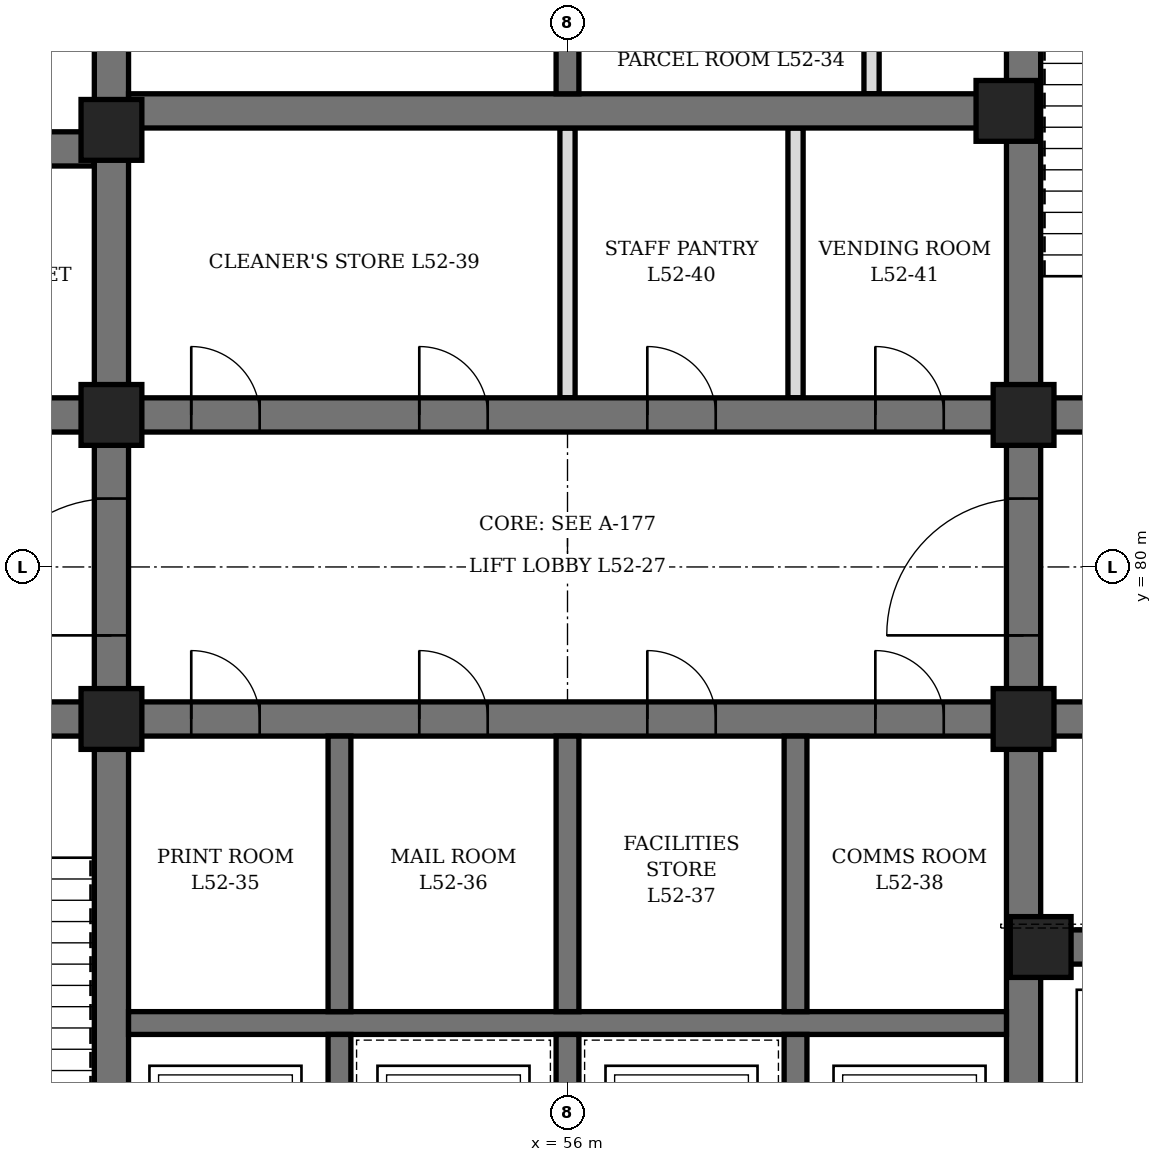
"""IFC4 building model, lengths in metres.
Left out: names, types, materials, properties, quantities, classifications, styles, units other than length and angle.
Written with IfcOpenShell. Run it as: python <this file> out.ifc"""

import sys

from ifc_helpers import new_model, si_unit, direction, frame, frame_2d, origin, origin_2d, place, context, subcontext, project, spatial, rectangle, hollow_rectangle, extrude, element, fill, save


model = new_model("IFC4")
c1 = context("Model", 3, precision=1e-05, world=origin(), true_north=direction((0.0, 1.0)))
c2 = subcontext(c1, "Body", "Model", "MODEL_VIEW")
j1 = project(units=[si_unit("LENGTHUNIT", "METRE"), si_unit("PLANEANGLEUNIT", "RADIAN")], contexts=[c1])
p1 = place(None, origin())
s1 = spatial("IfcSite", under=j1, at=p1, CompositionType="ELEMENT")
p2 = place(p1, origin())
s2 = spatial("IfcBuilding", under=s1, at=p2, CompositionType="ELEMENT")
p3 = place(p2, frame((0.0, 0.0, 231.7)))
s3 = spatial("IfcBuildingStorey", under=s2, at=p3, CompositionType="ELEMENT", Elevation=231.7)
p4 = place(p3, frame((50.0, 71.6, 0.0), z_axis=(0.0, 0.0, 1.0), x_axis=(0.0, 1.0, 0.0)))
e1 = element("IfcWall", 1, at=p4, inside=s3, PredefinedType="SHEAR", context=c2, shape_type="SweptSolid", body=[
    extrude(rectangle(XDim=16.8, YDim=0.45, at=frame_2d((8.4, 0.0))), origin(), (0.0, 0.0, 1.0), 4.2),
])
p5 = place(p4, frame((7.5, 0.0, 0.0)))
e2 = element("IfcOpeningElement", 2, at=p5, cuts=e1, PredefinedType="OPENING", context=c2, shape_type="SweptSolid", body=[
    extrude(rectangle(XDim=1.8, YDim=2.4, at=frame_2d((0.9, 1.2))), frame((0.0, 0.235, 0.0), z_axis=(0.0, -1.0, 0.0), x_axis=(1.0, 0.0, 0.0)), (0.0, 0.0, 1.0), 0.47),
])
p6 = place(p3, frame((62.0, 71.6, 0.0), z_axis=(0.0, 0.0, 1.0), x_axis=(0.0, 1.0, 0.0)))
e3 = element("IfcWall", 3, at=p6, inside=s3, PredefinedType="SHEAR", context=c2, shape_type="SweptSolid", body=[
    extrude(rectangle(XDim=16.8, YDim=0.45, at=frame_2d((8.4, 0.0))), origin(), (0.0, 0.0, 1.0), 4.2),
])
p7 = place(p6, frame((7.5, 0.0, 0.0)))
e4 = element("IfcOpeningElement", 4, at=p7, cuts=e3, PredefinedType="OPENING", context=c2, shape_type="SweptSolid", body=[
    extrude(rectangle(XDim=1.8, YDim=2.4, at=frame_2d((0.9, 1.2))), frame((0.0, 0.235, 0.0), z_axis=(0.0, -1.0, 0.0), x_axis=(1.0, 0.0, 0.0)), (0.0, 0.0, 1.0), 0.47),
])
p8 = place(p3, frame((44.6, 78.0, 0.0), z_axis=(0.0, 0.0, 1.0), x_axis=(1.0, 0.0, 0.0)))
e5 = element("IfcWall", 5, at=p8, inside=s3, PredefinedType="SHEAR", context=c2, shape_type="SweptSolid", body=[
    extrude(rectangle(XDim=5.175, YDim=0.45, at=frame_2d((2.587, 0.0))), origin(), (0.0, 0.0, 1.0), 4.2),
])
p9 = place(p8, frame((1.8, 0.0, 0.0)))
e6 = element("IfcOpeningElement", 6, at=p9, cuts=e5, PredefinedType="OPENING", context=c2, shape_type="SweptSolid", body=[
    extrude(rectangle(XDim=1.2, YDim=2.1, at=frame_2d((0.6, 1.05))), frame((0.0, 0.235, 0.0), z_axis=(0.0, -1.0, 0.0), x_axis=(1.0, 0.0, 0.0)), (0.0, 0.0, 1.0), 0.47),
])
p10 = place(p3, frame((44.6, 82.0, 0.0), z_axis=(0.0, 0.0, 1.0), x_axis=(1.0, 0.0, 0.0)))
e7 = element("IfcWall", 7, at=p10, inside=s3, PredefinedType="SHEAR", context=c2, shape_type="SweptSolid", body=[
    extrude(rectangle(XDim=5.175, YDim=0.45, at=frame_2d((2.587, 0.0))), origin(), (0.0, 0.0, 1.0), 4.2),
])
p11 = place(p10, frame((0.7, 0.0, 0.0)))
e8 = element("IfcOpeningElement", 8, at=p11, cuts=e7, PredefinedType="OPENING", context=c2, shape_type="SweptSolid", body=[
    extrude(rectangle(XDim=0.9, YDim=2.1, at=frame_2d((0.45, 1.05))), frame((0.0, 0.235, 0.0), z_axis=(0.0, -1.0, 0.0), x_axis=(1.0, 0.0, 0.0)), (0.0, 0.0, 1.0), 0.47),
])
p12 = place(p3, frame((44.6, 85.5, 0.0), z_axis=(0.0, 0.0, 1.0), x_axis=(1.0, 0.0, 0.0)))
e9 = element("IfcWall", 9, at=p12, inside=s3, PredefinedType="SHEAR", context=c2, shape_type="SweptSolid", body=[
    extrude(rectangle(XDim=5.175, YDim=0.45, at=frame_2d((2.587, 0.0))), origin(), (0.0, 0.0, 1.0), 4.2),
])
p13 = place(p12, frame((0.7, 0.0, 0.0)))
e10 = element("IfcOpeningElement", 10, at=p13, cuts=e9, PredefinedType="OPENING", context=c2, shape_type="SweptSolid", body=[
    extrude(rectangle(XDim=0.9, YDim=2.1, at=frame_2d((0.45, 1.05))), frame((0.0, 0.235, 0.0), z_axis=(0.0, -1.0, 0.0), x_axis=(1.0, 0.0, 0.0)), (0.0, 0.0, 1.0), 0.47),
])
p14 = place(p3, frame((62.225, 75.0, 0.0), z_axis=(0.0, 0.0, 1.0), x_axis=(1.0, 0.0, 0.0)))
e11 = element("IfcWall", 11, at=p14, inside=s3, PredefinedType="SHEAR", context=c2, shape_type="SweptSolid", body=[
    extrude(rectangle(XDim=5.175, YDim=0.45, at=frame_2d((2.587, 0.0))), origin(), (0.0, 0.0, 1.0), 4.2),
])
p15 = place(p14, frame((0.675, 0.0, 0.0)))
e12 = element("IfcOpeningElement", 12, at=p15, cuts=e11, PredefinedType="OPENING", context=c2, shape_type="SweptSolid", body=[
    extrude(rectangle(XDim=1.2, YDim=2.2, at=frame_2d((0.6, 1.1))), frame((0.0, 0.235, 0.0), z_axis=(0.0, -1.0, 0.0), x_axis=(1.0, 0.0, 0.0)), (0.0, 0.0, 1.0), 0.47),
])
p16 = place(p14, frame((3.425, 0.0, 0.0)))
e13 = element("IfcOpeningElement", 13, at=p16, cuts=e11, PredefinedType="OPENING", context=c2, shape_type="SweptSolid", body=[
    extrude(rectangle(XDim=1.2, YDim=2.2, at=frame_2d((0.6, 1.1))), frame((0.0, 0.235, 0.0), z_axis=(0.0, -1.0, 0.0), x_axis=(1.0, 0.0, 0.0)), (0.0, 0.0, 1.0), 0.47),
])
p17 = place(p3, frame((62.225, 78.0, 0.0), z_axis=(0.0, 0.0, 1.0), x_axis=(1.0, 0.0, 0.0)))
e14 = element("IfcWall", 14, at=p17, inside=s3, PredefinedType="SHEAR", context=c2, shape_type="SweptSolid", body=[
    extrude(rectangle(XDim=5.175, YDim=0.45, at=frame_2d((2.587, 0.0))), origin(), (0.0, 0.0, 1.0), 4.2),
])
p18 = place(p17, frame((2.175, 0.0, 0.0)))
e15 = element("IfcOpeningElement", 15, at=p18, cuts=e14, PredefinedType="OPENING", context=c2, shape_type="SweptSolid", body=[
    extrude(rectangle(XDim=1.2, YDim=2.1, at=frame_2d((0.6, 1.05))), frame((0.0, 0.235, 0.0), z_axis=(0.0, -1.0, 0.0), x_axis=(1.0, 0.0, 0.0)), (0.0, 0.0, 1.0), 0.47),
])
p19 = place(p3, frame((62.225, 82.0, 0.0), z_axis=(0.0, 0.0, 1.0), x_axis=(1.0, 0.0, 0.0)))
e16 = element("IfcWall", 16, at=p19, inside=s3, PredefinedType="SHEAR", context=c2, shape_type="SweptSolid", body=[
    extrude(rectangle(XDim=5.175, YDim=0.45, at=frame_2d((2.587, 0.0))), origin(), (0.0, 0.0, 1.0), 4.2),
])
p20 = place(p19, frame((2.175, 0.0, 0.0)))
e17 = element("IfcOpeningElement", 17, at=p20, cuts=e16, PredefinedType="OPENING", context=c2, shape_type="SweptSolid", body=[
    extrude(rectangle(XDim=1.2, YDim=2.1, at=frame_2d((0.6, 1.05))), frame((0.0, 0.235, 0.0), z_axis=(0.0, -1.0, 0.0), x_axis=(1.0, 0.0, 0.0)), (0.0, 0.0, 1.0), 0.47),
])
p21 = place(p3, frame((50.225, 78.0, 0.0), z_axis=(0.0, 0.0, 1.0), x_axis=(1.0, 0.0, 0.0)))
e18 = element("IfcWall", 18, at=p21, inside=s3, PredefinedType="SHEAR", context=c2, shape_type="SweptSolid", body=[
    extrude(rectangle(XDim=11.55, YDim=0.45, at=frame_2d((5.775, 0.0))), origin(), (0.0, 0.0, 1.0), 4.2),
])
p22 = place(p21, frame((0.825, 0.0, 0.0)))
e19 = element("IfcOpeningElement", 19, at=p22, cuts=e18, PredefinedType="OPENING", context=c2, shape_type="SweptSolid", body=[
    extrude(rectangle(XDim=0.9, YDim=2.1, at=frame_2d((0.45, 1.05))), frame((0.0, 0.235, 0.0), z_axis=(0.0, -1.0, 0.0), x_axis=(1.0, 0.0, 0.0)), (0.0, 0.0, 1.0), 0.47),
])
p23 = place(p21, frame((3.825, 0.0, 0.0)))
e20 = element("IfcOpeningElement", 20, at=p23, cuts=e18, PredefinedType="OPENING", context=c2, shape_type="SweptSolid", body=[
    extrude(rectangle(XDim=0.9, YDim=2.1, at=frame_2d((0.45, 1.05))), frame((0.0, 0.235, 0.0), z_axis=(0.0, -1.0, 0.0), x_axis=(1.0, 0.0, 0.0)), (0.0, 0.0, 1.0), 0.47),
])
p24 = place(p21, frame((6.825, 0.0, 0.0)))
e21 = element("IfcOpeningElement", 21, at=p24, cuts=e18, PredefinedType="OPENING", context=c2, shape_type="SweptSolid", body=[
    extrude(rectangle(XDim=0.9, YDim=2.1, at=frame_2d((0.45, 1.05))), frame((0.0, 0.235, 0.0), z_axis=(0.0, -1.0, 0.0), x_axis=(1.0, 0.0, 0.0)), (0.0, 0.0, 1.0), 0.47),
])
p25 = place(p21, frame((9.825, 0.0, 0.0)))
e22 = element("IfcOpeningElement", 22, at=p25, cuts=e18, PredefinedType="OPENING", context=c2, shape_type="SweptSolid", body=[
    extrude(rectangle(XDim=0.9, YDim=2.1, at=frame_2d((0.45, 1.05))), frame((0.0, 0.235, 0.0), z_axis=(0.0, -1.0, 0.0), x_axis=(1.0, 0.0, 0.0)), (0.0, 0.0, 1.0), 0.47),
])
p26 = place(p3, frame((50.225, 82.0, 0.0), z_axis=(0.0, 0.0, 1.0), x_axis=(1.0, 0.0, 0.0)))
e23 = element("IfcWall", 23, at=p26, inside=s3, PredefinedType="SHEAR", context=c2, shape_type="SweptSolid", body=[
    extrude(rectangle(XDim=11.55, YDim=0.45, at=frame_2d((5.775, 0.0))), origin(), (0.0, 0.0, 1.0), 4.2),
])
p27 = place(p26, frame((0.825, 0.0, 0.0)))
e24 = element("IfcOpeningElement", 24, at=p27, cuts=e23, PredefinedType="OPENING", context=c2, shape_type="SweptSolid", body=[
    extrude(rectangle(XDim=0.9, YDim=2.1, at=frame_2d((0.45, 1.05))), frame((0.0, 0.235, 0.0), z_axis=(0.0, -1.0, 0.0), x_axis=(1.0, 0.0, 0.0)), (0.0, 0.0, 1.0), 0.47),
])
p28 = place(p26, frame((3.825, 0.0, 0.0)))
e25 = element("IfcOpeningElement", 25, at=p28, cuts=e23, PredefinedType="OPENING", context=c2, shape_type="SweptSolid", body=[
    extrude(rectangle(XDim=0.9, YDim=2.1, at=frame_2d((0.45, 1.05))), frame((0.0, 0.235, 0.0), z_axis=(0.0, -1.0, 0.0), x_axis=(1.0, 0.0, 0.0)), (0.0, 0.0, 1.0), 0.47),
])
p29 = place(p26, frame((6.825, 0.0, 0.0)))
e26 = element("IfcOpeningElement", 26, at=p29, cuts=e23, PredefinedType="OPENING", context=c2, shape_type="SweptSolid", body=[
    extrude(rectangle(XDim=0.9, YDim=2.1, at=frame_2d((0.45, 1.05))), frame((0.0, 0.235, 0.0), z_axis=(0.0, -1.0, 0.0), x_axis=(1.0, 0.0, 0.0)), (0.0, 0.0, 1.0), 0.47),
])
p30 = place(p26, frame((9.825, 0.0, 0.0)))
e27 = element("IfcOpeningElement", 27, at=p30, cuts=e23, PredefinedType="OPENING", context=c2, shape_type="SweptSolid", body=[
    extrude(rectangle(XDim=0.9, YDim=2.1, at=frame_2d((0.45, 1.05))), frame((0.0, 0.235, 0.0), z_axis=(0.0, -1.0, 0.0), x_axis=(1.0, 0.0, 0.0)), (0.0, 0.0, 1.0), 0.47),
])
p31 = place(p3, frame((50.225, 86.0, 0.0), z_axis=(0.0, 0.0, 1.0), x_axis=(1.0, 0.0, 0.0)))
e28 = element("IfcWall", 28, at=p31, inside=s3, PredefinedType="SHEAR", context=c2, shape_type="SweptSolid", body=[
    extrude(rectangle(XDim=11.55, YDim=0.45, at=frame_2d((5.775, 0.0))), origin(), (0.0, 0.0, 1.0), 4.2),
])
p32 = place(p3, frame((50.225, 74.0, 0.0), z_axis=(0.0, 0.0, 1.0), x_axis=(1.0, 0.0, 0.0)))
e29 = element("IfcWall", 29, at=p32, inside=s3, PredefinedType="SHEAR", context=c2, shape_type="SweptSolid", body=[
    extrude(rectangle(XDim=11.55, YDim=0.3, at=frame_2d((5.775, 0.0))), origin(), (0.0, 0.0, 1.0), 4.2),
])
p33 = place(p3, frame((53.0, 71.6, 0.0), z_axis=(0.0, 0.0, 1.0), x_axis=(0.0, 1.0, 0.0)))
e30 = element("IfcWall", 30, at=p33, inside=s3, PredefinedType="SHEAR", context=c2, shape_type="SweptSolid", body=[
    extrude(rectangle(XDim=2.25, YDim=0.3, at=frame_2d((1.125, 0.0))), origin(), (0.0, 0.0, 1.0), 4.2),
])
p34 = place(p3, frame((53.0, 74.15, 0.0), z_axis=(0.0, 0.0, 1.0), x_axis=(0.0, 1.0, 0.0)))
e31 = element("IfcWall", 31, at=p34, inside=s3, PredefinedType="SHEAR", context=c2, shape_type="SweptSolid", body=[
    extrude(rectangle(XDim=3.625, YDim=0.3, at=frame_2d((1.812, 0.0))), origin(), (0.0, 0.0, 1.0), 4.2),
])
p35 = place(p3, frame((56.0, 71.6, 0.0), z_axis=(0.0, 0.0, 1.0), x_axis=(0.0, 1.0, 0.0)))
e32 = element("IfcWall", 32, at=p35, inside=s3, PredefinedType="SHEAR", context=c2, shape_type="SweptSolid", body=[
    extrude(rectangle(XDim=2.25, YDim=0.3, at=frame_2d((1.125, 0.0))), origin(), (0.0, 0.0, 1.0), 4.2),
])
p36 = place(p3, frame((56.0, 74.15, 0.0), z_axis=(0.0, 0.0, 1.0), x_axis=(0.0, 1.0, 0.0)))
e33 = element("IfcWall", 33, at=p36, inside=s3, PredefinedType="SHEAR", context=c2, shape_type="SweptSolid", body=[
    extrude(rectangle(XDim=3.625, YDim=0.3, at=frame_2d((1.812, 0.0))), origin(), (0.0, 0.0, 1.0), 4.2),
])
p37 = place(p3, frame((59.0, 71.6, 0.0), z_axis=(0.0, 0.0, 1.0), x_axis=(0.0, 1.0, 0.0)))
e34 = element("IfcWall", 34, at=p37, inside=s3, PredefinedType="SHEAR", context=c2, shape_type="SweptSolid", body=[
    extrude(rectangle(XDim=2.25, YDim=0.3, at=frame_2d((1.125, 0.0))), origin(), (0.0, 0.0, 1.0), 4.2),
])
p38 = place(p3, frame((59.0, 74.15, 0.0), z_axis=(0.0, 0.0, 1.0), x_axis=(0.0, 1.0, 0.0)))
e35 = element("IfcWall", 35, at=p38, inside=s3, PredefinedType="SHEAR", context=c2, shape_type="SweptSolid", body=[
    extrude(rectangle(XDim=3.625, YDim=0.3, at=frame_2d((1.812, 0.0))), origin(), (0.0, 0.0, 1.0), 4.2),
])
p39 = place(p3, frame((56.0, 86.225, 0.0), z_axis=(0.0, 0.0, 1.0), x_axis=(0.0, 1.0, 0.0)))
e36 = element("IfcWall", 36, at=p39, inside=s3, PredefinedType="SHEAR", context=c2, shape_type="SweptSolid", body=[
    extrude(rectangle(XDim=2.175, YDim=0.3, at=frame_2d((1.087, 0.0))), origin(), (0.0, 0.0, 1.0), 4.2),
])
for number, where, z_axis, x_axis in (
    (37, (50.0, 78.0, 0.0), (0.0, 0.0, 1.0), (1.0, 0.0, 0.0)),
    (38, (50.0, 82.0, 0.0), (0.0, 0.0, 1.0), (1.0, 0.0, 0.0)),
    (39, (50.0, 85.75, 0.0), (0.0, 0.0, 1.0), (1.0, 0.0, 0.0)),
    (40, (61.775, 86.0, 0.0), (0.0, 0.0, 1.0), (1.0, 0.0, 0.0)),
    (41, (62.0, 78.0, 0.0), (0.0, 0.0, 1.0), (1.0, 0.0, 0.0)),
    (42, (62.0, 82.0, 0.0), (0.0, 0.0, 1.0), (1.0, 0.0, 0.0)),
    (43, (62.225, 75.0, 0.0), (0.0, 0.0, 1.0), (1.0, 0.0, 0.0)),
):
    element("IfcColumn", number, at=place(p3, frame(where, z_axis=z_axis, x_axis=x_axis)), inside=s3, PredefinedType="COLUMN", context=c2, shape_type="SweptSolid", body=[
        extrude(hollow_rectangle(XDim=0.8, YDim=0.8, WallThickness=0.1, at=origin_2d()), origin(), (0.0, 0.0, 1.0), 4.2),
    ])
p40 = place(p3, frame((60.0, 86.225, 0.0), z_axis=(0.0, 0.0, 1.0), x_axis=(0.0, 1.0, 0.0)))
e44 = element("IfcWall", 44, at=p40, inside=s3, PredefinedType="PARTITIONING", context=c2, shape_type="SweptSolid", body=[
    extrude(rectangle(XDim=2.175, YDim=0.2, at=frame_2d((1.087, 0.0))), origin(), (0.0, 0.0, 1.0), 4.04),
])
p41 = place(p40, frame((0.637, 0.0, 0.0)))
e45 = element("IfcOpeningElement", 45, at=p41, cuts=e44, PredefinedType="OPENING", context=c2, shape_type="SweptSolid", body=[
    extrude(rectangle(XDim=0.9, YDim=2.1, at=frame_2d((0.45, 1.05))), frame((0.0, 0.11, 0.0), z_axis=(0.0, -1.0, 0.0), x_axis=(1.0, 0.0, 0.0)), (0.0, 0.0, 1.0), 0.22),
])
p42 = place(p3, frame((56.0, 82.225, 0.0), z_axis=(0.0, 0.0, 1.0), x_axis=(0.0, 1.0, 0.0)))
e46 = element("IfcWall", 46, at=p42, inside=s3, PredefinedType="PARTITIONING", context=c2, shape_type="SweptSolid", body=[
    extrude(rectangle(XDim=3.55, YDim=0.2, at=frame_2d((1.775, 0.0))), origin(), (0.0, 0.0, 1.0), 3.14),
])
p43 = place(p3, frame((59.0, 82.225, 0.0), z_axis=(0.0, 0.0, 1.0), x_axis=(0.0, 1.0, 0.0)))
e47 = element("IfcWall", 47, at=p43, inside=s3, PredefinedType="PARTITIONING", context=c2, shape_type="SweptSolid", body=[
    extrude(rectangle(XDim=3.55, YDim=0.2, at=frame_2d((1.775, 0.0))), origin(), (0.0, 0.0, 1.0), 4.04),
])
p44 = place(p22, origin())
e48 = element("IfcDoor", 48, at=p44, inside=s3, OperationType="SINGLE_SWING_LEFT", PredefinedType="DOOR", context=c2, shape_type="SweptSolid", body=[
    extrude(rectangle(XDim=0.9, YDim=2.1, at=frame_2d((0.45, 1.05))), frame((0.0, 0.225, 0.0), z_axis=(0.0, -1.0, 0.0), x_axis=(1.0, 0.0, 0.0)), (0.0, 0.0, 1.0), 0.449),
])
fill(e19, e48)
p45 = place(p23, origin())
e49 = element("IfcDoor", 49, at=p45, inside=s3, OperationType="SINGLE_SWING_LEFT", PredefinedType="DOOR", context=c2, shape_type="SweptSolid", body=[
    extrude(rectangle(XDim=0.9, YDim=2.1, at=frame_2d((0.45, 1.05))), frame((0.0, 0.225, 0.0), z_axis=(0.0, -1.0, 0.0), x_axis=(1.0, 0.0, 0.0)), (0.0, 0.0, 1.0), 0.449),
])
fill(e20, e49)
p46 = place(p24, origin())
e50 = element("IfcDoor", 50, at=p46, inside=s3, OperationType="SINGLE_SWING_LEFT", PredefinedType="DOOR", context=c2, shape_type="SweptSolid", body=[
    extrude(rectangle(XDim=0.9, YDim=2.1, at=frame_2d((0.45, 1.05))), frame((0.0, 0.225, 0.0), z_axis=(0.0, -1.0, 0.0), x_axis=(1.0, 0.0, 0.0)), (0.0, 0.0, 1.0), 0.449),
])
fill(e21, e50)
p47 = place(p25, origin())
e51 = element("IfcDoor", 51, at=p47, inside=s3, OperationType="SINGLE_SWING_LEFT", PredefinedType="DOOR", context=c2, shape_type="SweptSolid", body=[
    extrude(rectangle(XDim=0.9, YDim=2.1, at=frame_2d((0.45, 1.05))), frame((0.0, 0.225, 0.0), z_axis=(0.0, -1.0, 0.0), x_axis=(1.0, 0.0, 0.0)), (0.0, 0.0, 1.0), 0.449),
])
fill(e22, e51)
p48 = place(p27, origin())
e52 = element("IfcDoor", 52, at=p48, inside=s3, OperationType="SINGLE_SWING_LEFT", PredefinedType="DOOR", context=c2, shape_type="SweptSolid", body=[
    extrude(rectangle(XDim=0.9, YDim=2.1, at=frame_2d((0.45, 1.05))), frame((0.0, 0.225, 0.0), z_axis=(0.0, -1.0, 0.0), x_axis=(1.0, 0.0, 0.0)), (0.0, 0.0, 1.0), 0.449),
])
fill(e24, e52)
p49 = place(p28, origin())
e53 = element("IfcDoor", 53, at=p49, inside=s3, OperationType="SINGLE_SWING_LEFT", PredefinedType="DOOR", context=c2, shape_type="SweptSolid", body=[
    extrude(rectangle(XDim=0.9, YDim=2.1, at=frame_2d((0.45, 1.05))), frame((0.0, 0.225, 0.0), z_axis=(0.0, -1.0, 0.0), x_axis=(1.0, 0.0, 0.0)), (0.0, 0.0, 1.0), 0.449),
])
fill(e25, e53)
p50 = place(p29, origin())
e54 = element("IfcDoor", 54, at=p50, inside=s3, OperationType="SINGLE_SWING_LEFT", PredefinedType="DOOR", context=c2, shape_type="SweptSolid", body=[
    extrude(rectangle(XDim=0.9, YDim=2.1, at=frame_2d((0.45, 1.05))), frame((0.0, 0.225, 0.0), z_axis=(0.0, -1.0, 0.0), x_axis=(1.0, 0.0, 0.0)), (0.0, 0.0, 1.0), 0.449),
])
fill(e26, e54)
p51 = place(p30, origin())
e55 = element("IfcDoor", 55, at=p51, inside=s3, OperationType="SINGLE_SWING_LEFT", PredefinedType="DOOR", context=c2, shape_type="SweptSolid", body=[
    extrude(rectangle(XDim=0.9, YDim=2.1, at=frame_2d((0.45, 1.05))), frame((0.0, 0.225, 0.0), z_axis=(0.0, -1.0, 0.0), x_axis=(1.0, 0.0, 0.0)), (0.0, 0.0, 1.0), 0.449),
])
fill(e27, e55)
p52 = place(p5, origin())
e56 = element("IfcDoor", 56, at=p52, inside=s3, OperationType="DOUBLE_DOOR_SINGLE_SWING", PredefinedType="DOOR", context=c2, shape_type="SweptSolid", body=[
    extrude(rectangle(XDim=1.8, YDim=2.4, at=frame_2d((0.9, 1.2))), frame((0.0, 0.225, 0.0), z_axis=(0.0, -1.0, 0.0), x_axis=(1.0, 0.0, 0.0)), (0.0, 0.0, 1.0), 0.449),
])
fill(e2, e56)
p53 = place(p7, origin())
e57 = element("IfcDoor", 57, at=p53, inside=s3, OperationType="DOUBLE_DOOR_SINGLE_SWING", PredefinedType="DOOR", context=c2, shape_type="SweptSolid", body=[
    extrude(rectangle(XDim=1.8, YDim=2.4, at=frame_2d((0.9, 1.2))), frame((0.0, 0.225, 0.0), z_axis=(0.0, -1.0, 0.0), x_axis=(1.0, 0.0, 0.0)), (0.0, 0.0, 1.0), 0.449),
])
fill(e4, e57)
save(model, sys.argv[1])
